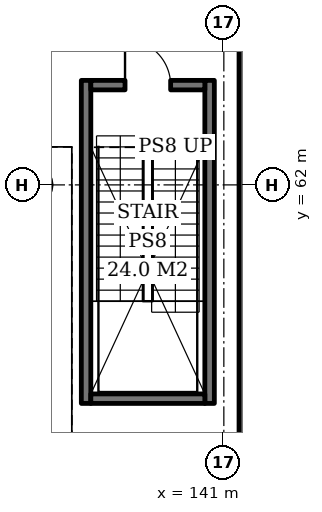
"""IFC4 building model, lengths in metres.
Left out: names, types, materials, properties, quantities, classifications, styles, units other than length and angle.
Written with IfcOpenShell. Run it as: python <this file> out.ifc"""

import sys

from ifc_helpers import new_model, si_unit, direction, frame, frame_2d, origin, place, context, subcontext, project, spatial, rectangle, extrude, element, fill, save


model = new_model("IFC4")
c1 = context("Model", 3, precision=1e-05, world=origin(), true_north=direction((0.0, 1.0)))
c2 = subcontext(c1, "Body", "Model", "MODEL_VIEW")
j1 = project(units=[si_unit("LENGTHUNIT", "METRE"), si_unit("PLANEANGLEUNIT", "RADIAN")], contexts=[c1])
p1 = place(None, origin())
s1 = spatial("IfcSite", under=j1, at=p1, CompositionType="ELEMENT")
p2 = place(p1, origin())
s2 = spatial("IfcBuilding", under=s1, at=p2, CompositionType="ELEMENT")
p3 = place(p2, frame((0.0, 0.0, -5.0)))
s3 = spatial("IfcBuildingStorey", under=s2, at=p3, CompositionType="ELEMENT", Elevation=-5.0)
p4 = place(p3, frame((141.7, 5.6, 0.0), z_axis=(0.0, 0.0, 1.0), x_axis=(0.0, 1.0, 0.0)))
e1 = element("IfcWall", 1, at=p4, inside=s3, PredefinedType="USERDEFINED", context=c2, shape_type="SweptSolid", body=[
    extrude(rectangle(XDim=88.8, YDim=0.6, at=frame_2d((44.4, 0.0))), origin(), (0.0, 0.0, 1.0), 5.0),
])
for number, where, z_axis, x_axis in (
    (2, (137.375, 56.25, 0.0), (0.0, 0.0, 1.0), (0.0, 1.0, 0.0)),
    (3, (140.625, 56.25, 0.0), (0.0, 0.0, 1.0), (0.0, 1.0, 0.0)),
):
    element("IfcWall", number, at=place(p3, frame(where, z_axis=z_axis, x_axis=x_axis)), inside=s3, PredefinedType="SOLIDWALL", context=c2, shape_type="SweptSolid", body=[
        extrude(rectangle(XDim=8.5, YDim=0.25, at=frame_2d((4.25, 0.0))), origin(), (0.0, 0.0, 1.0), 4.6),
    ])
p5 = place(p3, frame((137.5, 56.375, 0.0), z_axis=(0.0, 0.0, 1.0), x_axis=(1.0, 0.0, 0.0)))
e4 = element("IfcWall", 4, at=p5, inside=s3, PredefinedType="SOLIDWALL", context=c2, shape_type="SweptSolid", body=[
    extrude(rectangle(XDim=3.0, YDim=0.25, at=frame_2d((1.5, 0.0))), origin(), (0.0, 0.0, 1.0), 4.6),
])
p6 = place(p3, frame((137.5, 64.625, 0.0), z_axis=(0.0, 0.0, 1.0), x_axis=(1.0, 0.0, 0.0)))
e5 = element("IfcWall", 5, at=p6, inside=s3, PredefinedType="SOLIDWALL", context=c2, shape_type="SweptSolid", body=[
    extrude(rectangle(XDim=3.0, YDim=0.25, at=frame_2d((1.5, 0.0))), origin(), (0.0, 0.0, 1.0), 4.6),
])
p7 = place(p6, frame((0.9, 0.0, 0.0)))
e6 = element("IfcOpeningElement", 6, at=p7, cuts=e5, PredefinedType="OPENING", context=c2, shape_type="SweptSolid", body=[
    extrude(rectangle(XDim=1.2, YDim=2.1, at=frame_2d((0.6, 1.05))), frame((0.0, 0.135, 0.0), z_axis=(0.0, -1.0, 0.0), x_axis=(1.0, 0.0, 0.0)), (0.0, 0.0, 1.0), 0.27),
])
p8 = place(p7, origin())
e7 = element("IfcDoor", 7, at=p8, inside=s3, OperationType="SINGLE_SWING_LEFT", PredefinedType="DOOR", context=c2, shape_type="SweptSolid", body=[
    extrude(rectangle(XDim=1.2, YDim=2.1, at=frame_2d((0.6, 1.05))), frame((0.0, 0.025, 0.0), z_axis=(0.0, -1.0, 0.0), x_axis=(1.0, 0.0, 0.0)), (0.0, 0.0, 1.0), 0.05),
])
fill(e6, e7)
save(model, sys.argv[1])
